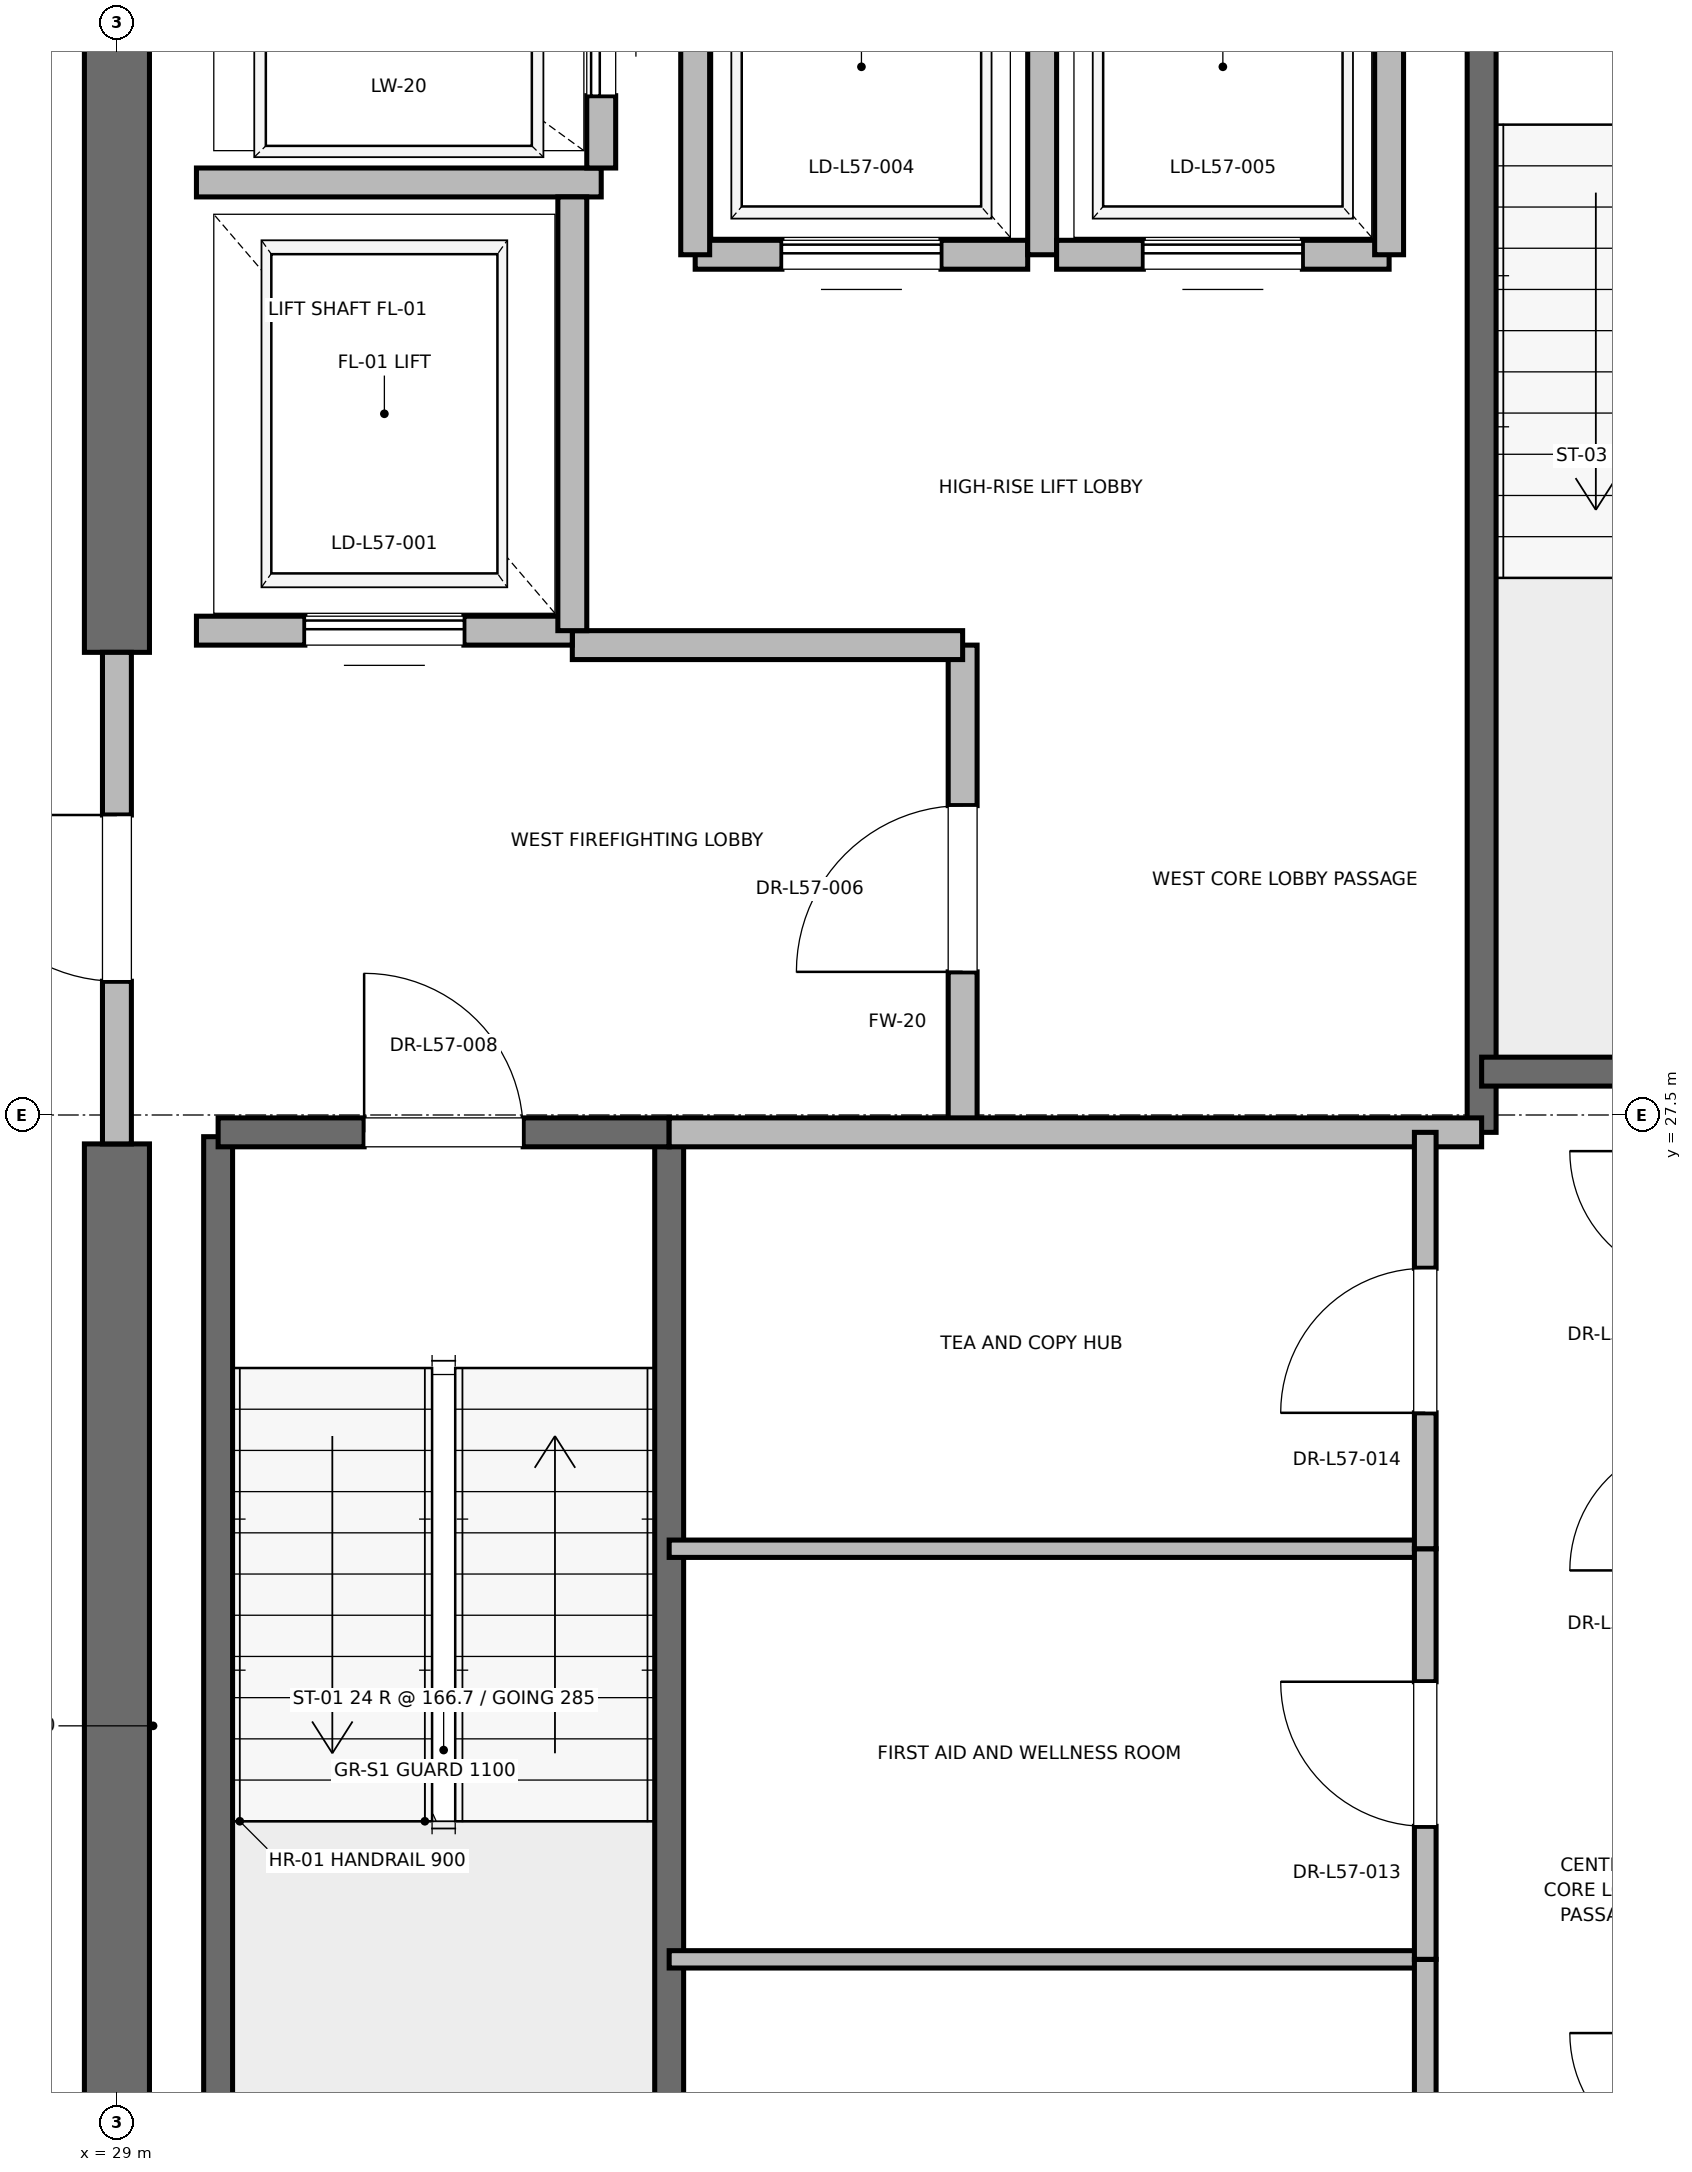
"""IFC4 building model, lengths in metres.
Left out: names, types, materials, properties, quantities, classifications, styles, units other than length and angle.
Written with IfcOpenShell. Run it as: python <this file> out.ifc"""

import sys

from ifc_helpers import new_model, si_unit, direction, frame, frame_2d, origin, place, context, subcontext, project, spatial, rectangle, extrude, element, fill, save


model = new_model("IFC4")
c1 = context("Model", 3, precision=1e-05, world=origin(), true_north=direction((0.0, 1.0)))
c2 = subcontext(c1, "Body", "Model", "MODEL_VIEW")
j1 = project(units=[si_unit("LENGTHUNIT", "METRE"), si_unit("PLANEANGLEUNIT", "RADIAN")], contexts=[c1])
p1 = place(None, origin())
s1 = spatial("IfcSite", under=j1, at=p1, CompositionType="ELEMENT")
p2 = place(p1, origin())
s2 = spatial("IfcBuilding", under=s1, at=p2, CompositionType="ELEMENT")
p3 = place(p2, frame((0.0, 0.0, 247.2)))
s3 = spatial("IfcBuildingStorey", under=s2, at=p3, CompositionType="ELEMENT", Elevation=247.2)
p4 = place(p3, frame((29.0, 18.5, 0.0), z_axis=(0.0, 0.0, 1.0), x_axis=(0.0, 1.0, 0.0)))
e1 = element("IfcWall", 1, at=p4, inside=s3, PredefinedType="SHEAR", context=c2, shape_type="SweptSolid", body=[
    extrude(rectangle(XDim=8.8, YDim=0.45, at=frame_2d((4.4, 0.0))), origin(), (0.0, 0.0, 1.0), 3.785),
])
p5 = place(p3, frame((29.0, 30.7, 0.0), z_axis=(0.0, 0.0, 1.0), x_axis=(0.0, 1.0, 0.0)))
e2 = element("IfcWall", 2, at=p5, inside=s3, PredefinedType="SHEAR", context=c2, shape_type="SweptSolid", body=[
    extrude(rectangle(XDim=5.8, YDim=0.45, at=frame_2d((2.9, 0.0))), origin(), (0.0, 0.0, 1.0), 3.785),
])
p6 = place(p3, frame((29.7, 19.2, 0.0), z_axis=(0.0, 0.0, 1.0), x_axis=(0.0, 1.0, 0.0)))
e3 = element("IfcWall", 3, at=p6, inside=s3, PredefinedType="SOLIDWALL", context=c2, shape_type="SweptSolid", body=[
    extrude(rectangle(XDim=8.15, YDim=0.2, at=frame_2d((4.075, 0.0))), origin(), (0.0, 0.0, 1.0), 3.785),
])
p7 = place(p3, frame((32.82, 18.6, 0.0), z_axis=(0.0, 0.0, 1.0), x_axis=(0.0, 1.0, 0.0)))
e4 = element("IfcWall", 4, at=p7, inside=s3, PredefinedType="SOLIDWALL", context=c2, shape_type="SweptSolid", body=[
    extrude(rectangle(XDim=8.78, YDim=0.2, at=frame_2d((4.39, 0.0))), origin(), (0.0, 0.0, 1.0), 3.785),
])
p8 = place(p3, frame((29.7, 27.38, 0.0), z_axis=(0.0, 0.0, 1.0), x_axis=(1.0, 0.0, 0.0)))
e5 = element("IfcWall", 5, at=p8, inside=s3, PredefinedType="SOLIDWALL", context=c2, shape_type="SweptSolid", body=[
    extrude(rectangle(XDim=3.12, YDim=0.2, at=frame_2d((1.56, 0.0))), origin(), (0.0, 0.0, 1.0), 3.785),
])
p9 = place(p8, frame((1.01, 0.0, 0.0)))
e6 = element("IfcOpeningElement", 6, at=p9, cuts=e5, PredefinedType="OPENING", context=c2, shape_type="SweptSolid", body=[
    extrude(rectangle(XDim=1.1, YDim=2.15, at=frame_2d((0.55, 1.075))), frame((0.0, 0.1, 0.0), z_axis=(0.0, -1.0, 0.0), x_axis=(1.0, 0.0, 0.0)), (0.0, 0.0, 1.0), 0.2),
])
p10 = place(p3, frame((38.44, 27.38, 0.0), z_axis=(0.0, 0.0, 1.0), x_axis=(0.0, 1.0, 0.0)))
e7 = element("IfcWall", 7, at=p10, inside=s3, PredefinedType="SOLIDWALL", context=c2, shape_type="SweptSolid", body=[
    extrude(rectangle(XDim=8.87, YDim=0.2, at=frame_2d((4.435, 0.0))), origin(), (0.0, 0.0, 1.0), 3.785),
])
p11 = place(p3, frame((38.44, 27.8, 0.0), z_axis=(0.0, 0.0, 1.0), x_axis=(1.0, 0.0, 0.0)))
e8 = element("IfcWall", 8, at=p11, inside=s3, PredefinedType="SOLIDWALL", context=c2, shape_type="SweptSolid", body=[
    extrude(rectangle(XDim=3.32, YDim=0.2, at=frame_2d((1.66, 0.0))), origin(), (0.0, 0.0, 1.0), 3.785),
])
p12 = place(p3, frame((34.85, 27.38, 0.0), z_axis=(0.0, 0.0, 1.0), x_axis=(0.0, 1.0, 0.0)))
e9 = element("IfcWall", 9, at=p12, inside=s3, PredefinedType="PARTITIONING", context=c2, shape_type="SweptSolid", body=[
    extrude(rectangle(XDim=3.37, YDim=0.2, at=frame_2d((1.685, 0.0))), origin(), (0.0, 0.0, 1.0), 3.785),
])
p13 = place(p12, frame((1.11, 0.0, 0.0)))
e10 = element("IfcOpeningElement", 10, at=p13, cuts=e9, PredefinedType="OPENING", context=c2, shape_type="SweptSolid", body=[
    extrude(rectangle(XDim=1.15, YDim=2.2, at=frame_2d((0.575, 1.1))), frame((0.0, 0.1, 0.0), z_axis=(0.0, -1.0, 0.0), x_axis=(1.0, 0.0, 0.0)), (0.0, 0.0, 1.0), 0.2),
])
p14 = place(p3, frame((29.0, 27.3, 0.0), z_axis=(0.0, 0.0, 1.0), x_axis=(0.0, 1.0, 0.0)))
e11 = element("IfcWall", 11, at=p14, inside=s3, PredefinedType="PARTITIONING", context=c2, shape_type="SweptSolid", body=[
    extrude(rectangle(XDim=3.4, YDim=0.2, at=frame_2d((1.7, 0.0))), origin(), (0.0, 0.0, 1.0), 2.865),
])
p15 = place(p14, frame((1.125, 0.0, 0.0)))
e12 = element("IfcOpeningElement", 12, at=p15, cuts=e11, PredefinedType="OPENING", context=c2, shape_type="SweptSolid", body=[
    extrude(rectangle(XDim=1.15, YDim=2.2, at=frame_2d((0.575, 1.1))), frame((0.0, 0.1, 0.0), z_axis=(0.0, -1.0, 0.0), x_axis=(1.0, 0.0, 0.0)), (0.0, 0.0, 1.0), 0.2),
])
p16 = place(p3, frame((32.82, 27.38, 0.0), z_axis=(0.0, 0.0, 1.0), x_axis=(1.0, 0.0, 0.0)))
e13 = element("IfcWall", 13, at=p16, inside=s3, PredefinedType="PARTITIONING", context=c2, shape_type="SweptSolid", body=[
    extrude(rectangle(XDim=5.62, YDim=0.2, at=frame_2d((2.81, 0.0))), origin(), (0.0, 0.0, 1.0), 3.785),
])
p17 = place(p3, frame((32.15, 30.75, 0.0), z_axis=(0.0, 0.0, 1.0), x_axis=(1.0, 0.0, 0.0)))
e14 = element("IfcWall", 14, at=p17, inside=s3, PredefinedType="PARTITIONING", context=c2, shape_type="SweptSolid", body=[
    extrude(rectangle(XDim=2.7, YDim=0.2, at=frame_2d((1.35, 0.0))), origin(), (0.0, 0.0, 1.0), 3.785),
])
p18 = place(p3, frame((29.55, 30.85, 0.0), z_axis=(0.0, 0.0, 1.0), x_axis=(1.0, 0.0, 0.0)))
e15 = element("IfcWall", 15, at=p18, inside=s3, PredefinedType="SOLIDWALL", context=c2, shape_type="SweptSolid", body=[
    extrude(rectangle(XDim=2.6, YDim=0.2, at=frame_2d((1.3, 0.0))), origin(), (0.0, 0.0, 1.0), 2.865),
])
p19 = place(p18, frame((0.75, 0.0, 0.0)))
e16 = element("IfcOpeningElement", 16, at=p19, cuts=e15, PredefinedType="OPENING", context=c2, shape_type="SweptSolid", body=[
    extrude(rectangle(XDim=1.1, YDim=2.2, at=frame_2d((0.55, 1.1))), frame((0.0, 0.1, 0.0), z_axis=(0.0, -1.0, 0.0), x_axis=(1.0, 0.0, 0.0)), (0.0, 0.0, 1.0), 0.2),
])
p20 = place(p3, frame((29.55, 33.95, 0.0), z_axis=(0.0, 0.0, 1.0), x_axis=(1.0, 0.0, 0.0)))
e17 = element("IfcWall", 17, at=p20, inside=s3, PredefinedType="SOLIDWALL", context=c2, shape_type="SweptSolid", body=[
    extrude(rectangle(XDim=2.8, YDim=0.2, at=frame_2d((1.4, 0.0))), origin(), (0.0, 0.0, 1.0), 3.785),
])
p21 = place(p3, frame((32.15, 30.85, 0.0), z_axis=(0.0, 0.0, 1.0), x_axis=(0.0, 1.0, 0.0)))
e18 = element("IfcWall", 18, at=p21, inside=s3, PredefinedType="SOLIDWALL", context=c2, shape_type="SweptSolid", body=[
    extrude(rectangle(XDim=3.0, YDim=0.2, at=frame_2d((1.5, 0.0))), origin(), (0.0, 0.0, 1.0), 3.785),
])
p22 = place(p3, frame((32.35, 34.05, 0.0), z_axis=(0.0, 0.0, 1.0), x_axis=(0.0, 1.0, 0.0)))
e19 = element("IfcWall", 19, at=p22, inside=s3, PredefinedType="SOLIDWALL", context=c2, shape_type="SweptSolid", body=[
    extrude(rectangle(XDim=2.1, YDim=0.2, at=frame_2d((1.05, 0.0))), origin(), (0.0, 0.0, 1.0), 3.785),
])
p23 = place(p22, frame((0.5, 0.0, 0.0)))
e20 = element("IfcOpeningElement", 20, at=p23, cuts=e19, PredefinedType="OPENING", context=c2, shape_type="SweptSolid", body=[
    extrude(rectangle(XDim=1.1, YDim=2.2, at=frame_2d((0.55, 1.1))), frame((0.0, 0.1, 0.0), z_axis=(0.0, -1.0, 0.0), x_axis=(1.0, 0.0, 0.0)), (0.0, 0.0, 1.0), 0.2),
])
p24 = place(p3, frame((33.0, 33.45, 0.0), z_axis=(0.0, 0.0, 1.0), x_axis=(1.0, 0.0, 0.0)))
e21 = element("IfcWall", 21, at=p24, inside=s3, PredefinedType="SOLIDWALL", context=c2, shape_type="SweptSolid", body=[
    extrude(rectangle(XDim=2.3, YDim=0.2, at=frame_2d((1.15, 0.0))), origin(), (0.0, 0.0, 1.0), 3.785),
])
p25 = place(p24, frame((0.6, 0.0, 0.0)))
e22 = element("IfcOpeningElement", 22, at=p25, cuts=e21, PredefinedType="OPENING", context=c2, shape_type="SweptSolid", body=[
    extrude(rectangle(XDim=1.1, YDim=2.2, at=frame_2d((0.55, 1.1))), frame((0.0, 0.1, 0.0), z_axis=(0.0, -1.0, 0.0), x_axis=(1.0, 0.0, 0.0)), (0.0, 0.0, 1.0), 0.2),
])
p26 = place(p3, frame((33.0, 36.05, 0.0), z_axis=(0.0, 0.0, 1.0), x_axis=(0.0, -1.0, 0.0)))
e23 = element("IfcWall", 23, at=p26, inside=s3, PredefinedType="SOLIDWALL", context=c2, shape_type="SweptSolid", body=[
    extrude(rectangle(XDim=2.6, YDim=0.2, at=frame_2d((1.3, 0.0))), origin(), (0.0, 0.0, 1.0), 3.785),
])
p27 = place(p3, frame((35.4, 33.45, 0.0), z_axis=(0.0, 0.0, 1.0), x_axis=(0.0, 1.0, 0.0)))
e24 = element("IfcWall", 24, at=p27, inside=s3, PredefinedType="SOLIDWALL", context=c2, shape_type="SweptSolid", body=[
    extrude(rectangle(XDim=2.6, YDim=0.2, at=frame_2d((1.3, 0.0))), origin(), (0.0, 0.0, 1.0), 2.865),
])
p28 = place(p3, frame((35.5, 33.45, 0.0), z_axis=(0.0, 0.0, 1.0), x_axis=(1.0, 0.0, 0.0)))
e25 = element("IfcWall", 25, at=p28, inside=s3, PredefinedType="SOLIDWALL", context=c2, shape_type="SweptSolid", body=[
    extrude(rectangle(XDim=2.3, YDim=0.2, at=frame_2d((1.15, 0.0))), origin(), (0.0, 0.0, 1.0), 3.785),
])
p29 = place(p28, frame((0.6, 0.0, 0.0)))
e26 = element("IfcOpeningElement", 26, at=p29, cuts=e25, PredefinedType="OPENING", context=c2, shape_type="SweptSolid", body=[
    extrude(rectangle(XDim=1.1, YDim=2.2, at=frame_2d((0.55, 1.1))), frame((0.0, 0.1, 0.0), z_axis=(0.0, -1.0, 0.0), x_axis=(1.0, 0.0, 0.0)), (0.0, 0.0, 1.0), 0.2),
])
p30 = place(p3, frame((37.8, 33.45, 0.0), z_axis=(0.0, 0.0, 1.0), x_axis=(0.0, 1.0, 0.0)))
e27 = element("IfcWall", 27, at=p30, inside=s3, PredefinedType="SOLIDWALL", context=c2, shape_type="SweptSolid", body=[
    extrude(rectangle(XDim=2.6, YDim=0.2, at=frame_2d((1.3, 0.0))), origin(), (0.0, 0.0, 1.0), 2.865),
])
for number, where, z_axis, x_axis in (
    (28, (32.82, 21.66, 0.0), (0.0, 0.0, 1.0), (1.0, 0.0, 0.0)),
    (29, (32.82, 24.5, 0.0), (0.0, 0.0, 1.0), (1.0, 0.0, 0.0)),
):
    element("IfcWall", number, at=place(p3, frame(where, z_axis=z_axis, x_axis=x_axis)), inside=s3, PredefinedType="PARTITIONING", context=c2, shape_type="SweptSolid", body=[
        extrude(rectangle(XDim=5.23, YDim=0.12, at=frame_2d((2.615, 0.0))), origin(), (0.0, 0.0, 1.0), 2.85),
    ])
p31 = place(p3, frame((38.05, 18.6, 0.0), z_axis=(0.0, 0.0, 1.0), x_axis=(0.0, 1.0, 0.0)))
e30 = element("IfcWall", 30, at=p31, inside=s3, PredefinedType="PARTITIONING", context=c2, shape_type="SweptSolid", body=[
    extrude(rectangle(XDim=3.06, YDim=0.15, at=frame_2d((1.53, 0.0))), origin(), (0.0, 0.0, 1.0), 2.85),
])
p32 = place(p31, frame((1.03, 0.0, 0.0)))
e31 = element("IfcOpeningElement", 31, at=p32, cuts=e30, PredefinedType="OPENING", context=c2, shape_type="SweptSolid", body=[
    extrude(rectangle(XDim=1.0, YDim=2.15, at=frame_2d((0.5, 1.075))), frame((0.0, 0.075, 0.0), z_axis=(0.0, -1.0, 0.0), x_axis=(1.0, 0.0, 0.0)), (0.0, 0.0, 1.0), 0.15),
])
p33 = place(p3, frame((38.05, 21.66, 0.0), z_axis=(0.0, 0.0, 1.0), x_axis=(0.0, 1.0, 0.0)))
e32 = element("IfcWall", 32, at=p33, inside=s3, PredefinedType="PARTITIONING", context=c2, shape_type="SweptSolid", body=[
    extrude(rectangle(XDim=2.84, YDim=0.15, at=frame_2d((1.42, 0.0))), origin(), (0.0, 0.0, 1.0), 2.85),
])
p34 = place(p33, frame((0.92, 0.0, 0.0)))
e33 = element("IfcOpeningElement", 33, at=p34, cuts=e32, PredefinedType="OPENING", context=c2, shape_type="SweptSolid", body=[
    extrude(rectangle(XDim=1.0, YDim=2.15, at=frame_2d((0.5, 1.075))), frame((0.0, 0.075, 0.0), z_axis=(0.0, -1.0, 0.0), x_axis=(1.0, 0.0, 0.0)), (0.0, 0.0, 1.0), 0.15),
])
p35 = place(p3, frame((38.05, 24.5, 0.0), z_axis=(0.0, 0.0, 1.0), x_axis=(0.0, 1.0, 0.0)))
e34 = element("IfcWall", 34, at=p35, inside=s3, PredefinedType="PARTITIONING", context=c2, shape_type="SweptSolid", body=[
    extrude(rectangle(XDim=2.88, YDim=0.15, at=frame_2d((1.44, 0.0))), origin(), (0.0, 0.0, 1.0), 2.85),
])
p36 = place(p35, frame((0.94, 0.0, 0.0)))
e35 = element("IfcOpeningElement", 35, at=p36, cuts=e34, PredefinedType="OPENING", context=c2, shape_type="SweptSolid", body=[
    extrude(rectangle(XDim=1.0, YDim=2.15, at=frame_2d((0.5, 1.075))), frame((0.0, 0.075, 0.0), z_axis=(0.0, -1.0, 0.0), x_axis=(1.0, 0.0, 0.0)), (0.0, 0.0, 1.0), 0.15),
])
p37 = place(p9, origin())
e36 = element("IfcDoor", 36, at=p37, inside=s3, OperationType="SINGLE_SWING_LEFT", PredefinedType="DOOR", context=c2, shape_type="SweptSolid", body=[
    extrude(rectangle(XDim=1.1, YDim=2.15, at=frame_2d((0.55, 1.075))), frame((0.0, 0.025, 0.0), z_axis=(0.0, -1.0, 0.0), x_axis=(1.0, 0.0, 0.0)), (0.0, 0.0, 1.0), 0.05),
])
fill(e6, e36)
p38 = place(p13, origin())
e37 = element("IfcDoor", 37, at=p38, inside=s3, OperationType="SINGLE_SWING_LEFT", PredefinedType="DOOR", context=c2, shape_type="SweptSolid", body=[
    extrude(rectangle(XDim=1.15, YDim=2.2, at=frame_2d((0.575, 1.1))), frame((0.0, 0.025, 0.0), z_axis=(0.0, -1.0, 0.0), x_axis=(1.0, 0.0, 0.0)), (0.0, 0.0, 1.0), 0.05),
])
fill(e10, e37)
p39 = place(p15, origin())
e38 = element("IfcDoor", 38, at=p39, inside=s3, OperationType="SINGLE_SWING_RIGHT", PredefinedType="DOOR", context=c2, shape_type="SweptSolid", body=[
    extrude(rectangle(XDim=1.15, YDim=2.2, at=frame_2d((0.575, 1.1))), frame((0.0, 0.025, 0.0), z_axis=(0.0, -1.0, 0.0), x_axis=(1.0, 0.0, 0.0)), (0.0, 0.0, 1.0), 0.05),
])
fill(e12, e38)
p40 = place(p19, origin())
e39 = element("IfcDoor", 39, at=p40, inside=s3, OperationType="SLIDING_TO_RIGHT", PredefinedType="DOOR", context=c2, shape_type="SweptSolid", body=[
    extrude(rectangle(XDim=1.1, YDim=2.2, at=frame_2d((0.55, 1.1))), frame((0.0, 0.025, 0.0), z_axis=(0.0, -1.0, 0.0), x_axis=(1.0, 0.0, 0.0)), (0.0, 0.0, 1.0), 0.05),
])
fill(e16, e39)
p41 = place(p23, origin())
e40 = element("IfcDoor", 40, at=p41, inside=s3, OperationType="SLIDING_TO_RIGHT", PredefinedType="DOOR", context=c2, shape_type="SweptSolid", body=[
    extrude(rectangle(XDim=1.1, YDim=2.2, at=frame_2d((0.55, 1.1))), frame((0.0, 0.025, 0.0), z_axis=(0.0, -1.0, 0.0), x_axis=(1.0, 0.0, 0.0)), (0.0, 0.0, 1.0), 0.05),
])
fill(e20, e40)
p42 = place(p25, origin())
e41 = element("IfcDoor", 41, at=p42, inside=s3, OperationType="SLIDING_TO_RIGHT", PredefinedType="DOOR", context=c2, shape_type="SweptSolid", body=[
    extrude(rectangle(XDim=1.1, YDim=2.2, at=frame_2d((0.55, 1.1))), frame((0.0, 0.025, 0.0), z_axis=(0.0, -1.0, 0.0), x_axis=(1.0, 0.0, 0.0)), (0.0, 0.0, 1.0), 0.05),
])
fill(e22, e41)
p43 = place(p29, origin())
e42 = element("IfcDoor", 42, at=p43, inside=s3, OperationType="SLIDING_TO_RIGHT", PredefinedType="DOOR", context=c2, shape_type="SweptSolid", body=[
    extrude(rectangle(XDim=1.1, YDim=2.2, at=frame_2d((0.55, 1.1))), frame((0.0, 0.025, 0.0), z_axis=(0.0, -1.0, 0.0), x_axis=(1.0, 0.0, 0.0)), (0.0, 0.0, 1.0), 0.05),
])
fill(e26, e42)
p44 = place(p34, origin())
e43 = element("IfcDoor", 43, at=p44, inside=s3, OperationType="SINGLE_SWING_RIGHT", PredefinedType="DOOR", context=c2, shape_type="SweptSolid", body=[
    extrude(rectangle(XDim=1.0, YDim=2.15, at=frame_2d((0.5, 1.075))), frame((0.0, 0.025, 0.0), z_axis=(0.0, -1.0, 0.0), x_axis=(1.0, 0.0, 0.0)), (0.0, 0.0, 1.0), 0.05),
])
fill(e33, e43)
p45 = place(p36, origin())
e44 = element("IfcDoor", 44, at=p45, inside=s3, OperationType="SINGLE_SWING_LEFT", PredefinedType="DOOR", context=c2, shape_type="SweptSolid", body=[
    extrude(rectangle(XDim=1.0, YDim=2.15, at=frame_2d((0.5, 1.075))), frame((0.0, 0.025, 0.0), z_axis=(0.0, -1.0, 0.0), x_axis=(1.0, 0.0, 0.0)), (0.0, 0.0, 1.0), 0.05),
])
fill(e35, e44)
save(model, sys.argv[1])
